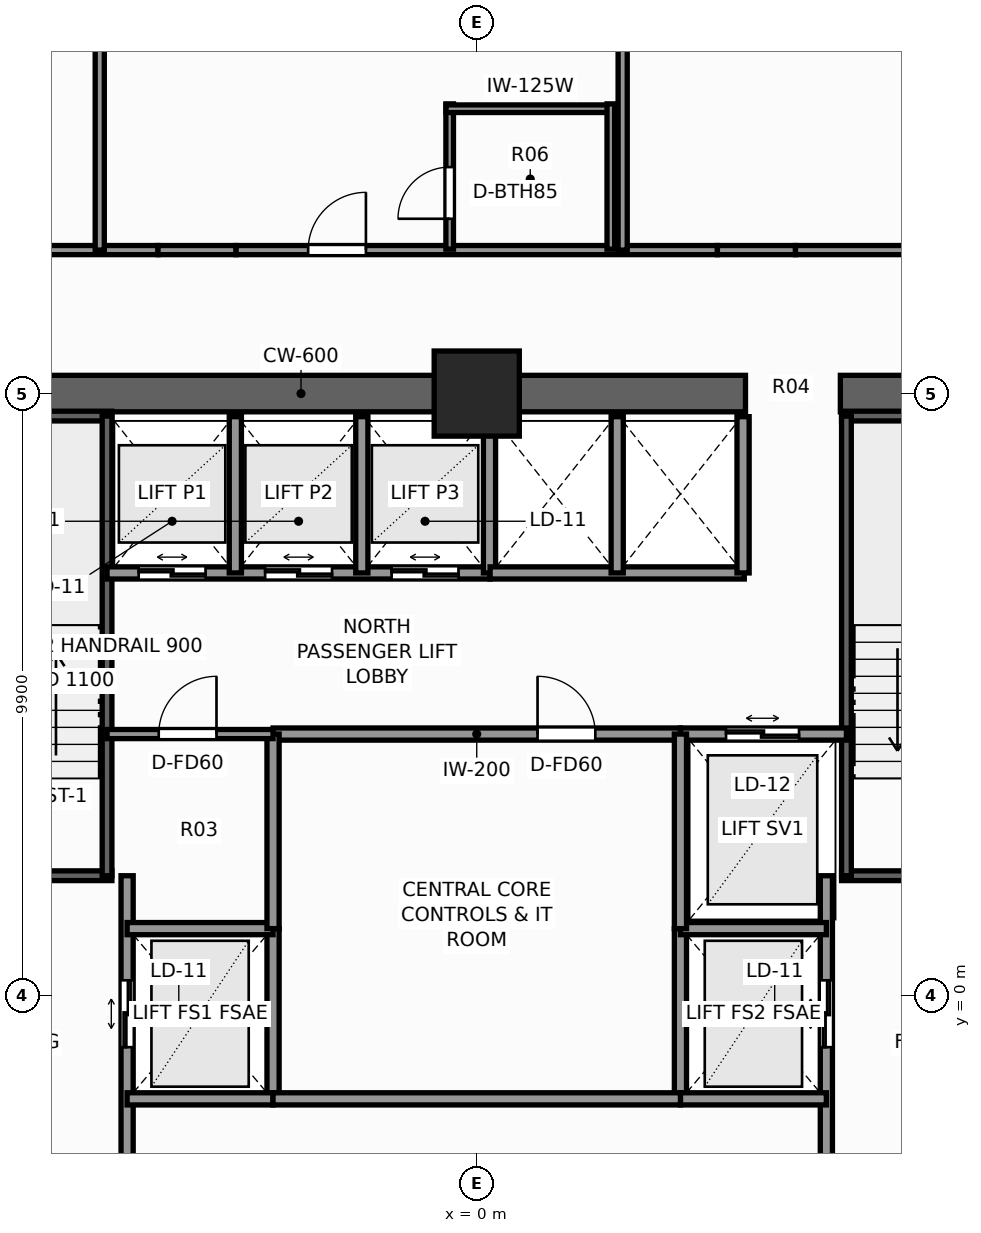
"""IFC4 building model, lengths in metres.
Left out: names, types, materials, properties, quantities, classifications, styles, units other than length and angle.
Written with IfcOpenShell. Run it as: python <this file> out.ifc"""

import sys

from ifc_helpers import new_model, si_unit, direction, frame, frame_2d, origin, origin_2d, place, context, subcontext, project, spatial, rectangle, extrude, element, fill, save


model = new_model("IFC4")
c1 = context("Model", 3, precision=1e-05, world=origin(), true_north=direction((0.0, 1.0)))
c2 = subcontext(c1, "Body", "Model", "MODEL_VIEW")
j1 = project(units=[si_unit("LENGTHUNIT", "METRE"), si_unit("PLANEANGLEUNIT", "RADIAN")], contexts=[c1])
p1 = place(None, origin())
s1 = spatial("IfcSite", under=j1, at=p1, CompositionType="ELEMENT")
p2 = place(p1, origin())
s2 = spatial("IfcBuilding", under=s1, at=p2, CompositionType="ELEMENT")
p3 = place(p2, frame((0.0, 0.0, 56.8)))
s3 = spatial("IfcBuildingStorey", under=s2, at=p3, CompositionType="ELEMENT", Elevation=56.8)
p4 = place(p3, frame((-10.2, 9.9, 0.0), z_axis=(0.0, 0.0, 1.0), x_axis=(1.0, 0.0, 0.0)))
e1 = element("IfcWall", 1, at=p4, inside=s3, PredefinedType="SHEAR", context=c2, shape_type="SweptSolid", body=[
    extrude(rectangle(XDim=14.62, YDim=0.6, at=frame_2d((7.31, 0.0))), origin(), (0.0, 0.0, 1.0), 3.3),
])
p5 = place(p3, frame((5.98, 9.9, 0.0), z_axis=(0.0, 0.0, 1.0), x_axis=(1.0, 0.0, 0.0)))
e2 = element("IfcWall", 2, at=p5, inside=s3, PredefinedType="SHEAR", context=c2, shape_type="SweptSolid", body=[
    extrude(rectangle(XDim=4.22, YDim=0.6, at=frame_2d((2.11, 0.0))), origin(), (0.0, 0.0, 1.0), 3.3),
])
p6 = place(p3, frame((0.0, 9.9, 0.0), z_axis=(0.0, 0.0, 1.0), x_axis=(1.0, 0.0, 0.0)))
e3 = element("IfcColumn", 3, at=p6, inside=s3, PredefinedType="COLUMN", context=c2, shape_type="SweptSolid", body=[
    extrude(rectangle(XDim=1.4, YDim=1.4, at=origin_2d()), origin(), (0.0, 0.0, 1.0), 3.3),
])
p7 = place(p3, frame((-9.52, 1.97, 0.0), z_axis=(0.0, 0.0, 1.0), x_axis=(1.0, 0.0, 0.0)))
e4 = element("IfcWall", 4, at=p7, inside=s3, PredefinedType="SHEAR", context=c2, shape_type="SweptSolid", body=[
    extrude(rectangle(XDim=3.52, YDim=0.16, at=frame_2d((1.76, 0.0))), origin(), (0.0, 0.0, 1.0), 3.3),
])
p8 = place(p7, frame((1.15, 0.0, 0.0)))
e5 = element("IfcOpeningElement", 5, at=p8, cuts=e4, PredefinedType="OPENING", context=c2, shape_type="SweptSolid", body=[
    extrude(rectangle(XDim=1.1, YDim=2.2, at=frame_2d((0.55, 1.1))), frame((0.0, 0.09, 0.0), z_axis=(0.0, -1.0, 0.0), x_axis=(1.0, 0.0, 0.0)), (0.0, 0.0, 1.0), 0.18),
])
p9 = place(p3, frame((-9.52, 9.53, 0.0), z_axis=(0.0, 0.0, 1.0), x_axis=(1.0, 0.0, 0.0)))
e6 = element("IfcWall", 6, at=p9, inside=s3, PredefinedType="SHEAR", context=c2, shape_type="SweptSolid", body=[
    extrude(rectangle(XDim=3.52, YDim=0.16, at=frame_2d((1.76, 0.0))), origin(), (0.0, 0.0, 1.0), 3.3),
])
p10 = place(p3, frame((-6.08, 1.97, 0.0), z_axis=(0.0, 0.0, 1.0), x_axis=(0.0, 1.0, 0.0)))
e7 = element("IfcWall", 7, at=p10, inside=s3, PredefinedType="SHEAR", context=c2, shape_type="SweptSolid", body=[
    extrude(rectangle(XDim=7.56, YDim=0.16, at=frame_2d((3.78, 0.0))), origin(), (0.0, 0.0, 1.0), 3.3),
])
p11 = place(p3, frame((6.0, 1.97, 0.0), z_axis=(0.0, 0.0, 1.0), x_axis=(1.0, 0.0, 0.0)))
e8 = element("IfcWall", 8, at=p11, inside=s3, PredefinedType="SHEAR", context=c2, shape_type="SweptSolid", body=[
    extrude(rectangle(XDim=3.52, YDim=0.16, at=frame_2d((1.76, 0.0))), origin(), (0.0, 0.0, 1.0), 3.3),
])
p12 = place(p11, frame((1.15, 0.0, 0.0)))
e9 = element("IfcOpeningElement", 9, at=p12, cuts=e8, PredefinedType="OPENING", context=c2, shape_type="SweptSolid", body=[
    extrude(rectangle(XDim=1.1, YDim=2.2, at=frame_2d((0.55, 1.1))), frame((0.0, 0.09, 0.0), z_axis=(0.0, -1.0, 0.0), x_axis=(1.0, 0.0, 0.0)), (0.0, 0.0, 1.0), 0.18),
])
p13 = place(p3, frame((6.0, 9.53, 0.0), z_axis=(0.0, 0.0, 1.0), x_axis=(1.0, 0.0, 0.0)))
e10 = element("IfcWall", 10, at=p13, inside=s3, PredefinedType="SHEAR", context=c2, shape_type="SweptSolid", body=[
    extrude(rectangle(XDim=3.52, YDim=0.16, at=frame_2d((1.76, 0.0))), origin(), (0.0, 0.0, 1.0), 3.3),
])
p14 = place(p3, frame((6.08, 1.97, 0.0), z_axis=(0.0, 0.0, 1.0), x_axis=(0.0, 1.0, 0.0)))
e11 = element("IfcWall", 11, at=p14, inside=s3, PredefinedType="SHEAR", context=c2, shape_type="SweptSolid", body=[
    extrude(rectangle(XDim=7.56, YDim=0.16, at=frame_2d((3.78, 0.0))), origin(), (0.0, 0.0, 1.0), 3.3),
])
p15 = place(p3, frame((-5.75, -3.6, 0.0), z_axis=(0.0, 0.0, 1.0), x_axis=(0.0, 1.0, 0.0)))
e12 = element("IfcWall", 12, at=p15, inside=s3, PredefinedType="SOLIDWALL", context=c2, shape_type="SweptSolid", body=[
    extrude(rectangle(XDim=5.57, YDim=0.2, at=frame_2d((2.785, 0.0))), origin(), (0.0, 0.0, 1.0), 3.06),
])
p16 = place(p15, frame((2.75, 0.0, 0.0)))
e13 = element("IfcOpeningElement", 13, at=p16, cuts=e12, PredefinedType="OPENING", context=c2, shape_type="SweptSolid", body=[
    extrude(rectangle(XDim=1.1, YDim=2.2, at=frame_2d((0.55, 1.1))), frame((0.0, 0.11, 0.0), z_axis=(0.0, -1.0, 0.0), x_axis=(1.0, 0.0, 0.0)), (0.0, 0.0, 1.0), 0.22),
])
p17 = place(p3, frame((-3.35, -1.7, 0.0), z_axis=(0.0, 0.0, 1.0), x_axis=(0.0, 1.0, 0.0)))
e14 = element("IfcWall", 14, at=p17, inside=s3, PredefinedType="SOLIDWALL", context=c2, shape_type="SweptSolid", body=[
    extrude(rectangle(XDim=2.8, YDim=0.2, at=frame_2d((1.4, 0.0))), origin(), (0.0, 0.0, 1.0), 3.06),
])
for number, where, z_axis, x_axis in (
    (15, (-5.75, -1.7, 0.0), (0.0, 0.0, 1.0), (1.0, 0.0, 0.0)),
    (16, (-5.75, 1.1, 0.0), (0.0, 0.0, 1.0), (1.0, 0.0, 0.0)),
):
    element("IfcWall", number, at=place(p3, frame(where, z_axis=z_axis, x_axis=x_axis)), inside=s3, PredefinedType="SOLIDWALL", context=c2, shape_type="SweptSolid", body=[
        extrude(rectangle(XDim=2.4, YDim=0.2, at=frame_2d((1.2, 0.0))), origin(), (0.0, 0.0, 1.0), 3.06),
    ])
p18 = place(p3, frame((5.75, -3.6, 0.0), z_axis=(0.0, 0.0, 1.0), x_axis=(0.0, 1.0, 0.0)))
e17 = element("IfcWall", 17, at=p18, inside=s3, PredefinedType="SOLIDWALL", context=c2, shape_type="SweptSolid", body=[
    extrude(rectangle(XDim=5.57, YDim=0.2, at=frame_2d((2.785, 0.0))), origin(), (0.0, 0.0, 1.0), 3.06),
])
p19 = place(p18, frame((2.75, 0.0, 0.0)))
e18 = element("IfcOpeningElement", 18, at=p19, cuts=e17, PredefinedType="OPENING", context=c2, shape_type="SweptSolid", body=[
    extrude(rectangle(XDim=1.1, YDim=2.2, at=frame_2d((0.55, 1.1))), frame((0.0, 0.11, 0.0), z_axis=(0.0, -1.0, 0.0), x_axis=(1.0, 0.0, 0.0)), (0.0, 0.0, 1.0), 0.22),
])
p20 = place(p3, frame((3.35, -1.7, 0.0), z_axis=(0.0, 0.0, 1.0), x_axis=(0.0, 1.0, 0.0)))
e19 = element("IfcWall", 19, at=p20, inside=s3, PredefinedType="SOLIDWALL", context=c2, shape_type="SweptSolid", body=[
    extrude(rectangle(XDim=2.8, YDim=0.2, at=frame_2d((1.4, 0.0))), origin(), (0.0, 0.0, 1.0), 3.06),
])
for number, where, z_axis, x_axis in (
    (20, (3.35, -1.7, 0.0), (0.0, 0.0, 1.0), (1.0, 0.0, 0.0)),
    (21, (3.35, 1.1, 0.0), (0.0, 0.0, 1.0), (1.0, 0.0, 0.0)),
):
    element("IfcWall", number, at=place(p3, frame(where, z_axis=z_axis, x_axis=x_axis)), inside=s3, PredefinedType="SOLIDWALL", context=c2, shape_type="SweptSolid", body=[
        extrude(rectangle(XDim=2.4, YDim=0.2, at=frame_2d((1.2, 0.0))), origin(), (0.0, 0.0, 1.0), 3.06),
    ])
p21 = place(p3, frame((3.35, 4.3, 0.0), z_axis=(0.0, 0.0, 1.0), x_axis=(1.0, 0.0, 0.0)))
e22 = element("IfcWall", 22, at=p21, inside=s3, PredefinedType="SOLIDWALL", context=c2, shape_type="SweptSolid", body=[
    extrude(rectangle(XDim=2.73, YDim=0.2, at=frame_2d((1.365, 0.0))), origin(), (0.0, 0.0, 1.0), 3.06),
])
p22 = place(p21, frame((0.75, 0.0, 0.0)))
e23 = element("IfcOpeningElement", 23, at=p22, cuts=e22, PredefinedType="OPENING", context=c2, shape_type="SweptSolid", body=[
    extrude(rectangle(XDim=1.2, YDim=2.25, at=frame_2d((0.6, 1.125))), frame((0.0, 0.11, 0.0), z_axis=(0.0, -1.0, 0.0), x_axis=(1.0, 0.0, 0.0)), (0.0, 0.0, 1.0), 0.22),
])
p23 = place(p3, frame((-6.08, 6.95, 0.0), z_axis=(0.0, 0.0, 1.0), x_axis=(1.0, 0.0, 0.0)))
e24 = element("IfcWall", 24, at=p23, inside=s3, PredefinedType="SOLIDWALL", context=c2, shape_type="SweptSolid", body=[
    extrude(rectangle(XDim=6.3, YDim=0.2, at=frame_2d((3.15, 0.0))), origin(), (0.0, 0.0, 1.0), 3.06),
])
p24 = place(p23, frame((0.52, 0.0, 0.0)))
e25 = element("IfcOpeningElement", 25, at=p24, cuts=e24, PredefinedType="OPENING", context=c2, shape_type="SweptSolid", body=[
    extrude(rectangle(XDim=1.1, YDim=2.2, at=frame_2d((0.55, 1.1))), frame((0.0, 0.11, 0.0), z_axis=(0.0, -1.0, 0.0), x_axis=(1.0, 0.0, 0.0)), (0.0, 0.0, 1.0), 0.22),
])
p25 = place(p23, frame((2.6, 0.0, 0.0)))
e26 = element("IfcOpeningElement", 26, at=p25, cuts=e24, PredefinedType="OPENING", context=c2, shape_type="SweptSolid", body=[
    extrude(rectangle(XDim=1.1, YDim=2.2, at=frame_2d((0.55, 1.1))), frame((0.0, 0.11, 0.0), z_axis=(0.0, -1.0, 0.0), x_axis=(1.0, 0.0, 0.0)), (0.0, 0.0, 1.0), 0.22),
])
p26 = place(p23, frame((4.68, 0.0, 0.0)))
e27 = element("IfcOpeningElement", 27, at=p26, cuts=e24, PredefinedType="OPENING", context=c2, shape_type="SweptSolid", body=[
    extrude(rectangle(XDim=1.1, YDim=2.2, at=frame_2d((0.55, 1.1))), frame((0.0, 0.11, 0.0), z_axis=(0.0, -1.0, 0.0), x_axis=(1.0, 0.0, 0.0)), (0.0, 0.0, 1.0), 0.22),
])
for number, where, z_axis, x_axis in (
    (28, (-3.97, 6.95, 0.0), (0.0, 0.0, 1.0), (0.0, 1.0, 0.0)),
    (29, (-1.89, 6.95, 0.0), (0.0, 0.0, 1.0), (0.0, 1.0, 0.0)),
    (30, (0.21, 6.95, 0.0), (0.0, 0.0, 1.0), (0.0, 1.0, 0.0)),
):
    element("IfcWall", number, at=place(p3, frame(where, z_axis=z_axis, x_axis=x_axis)), inside=s3, PredefinedType="SOLIDWALL", context=c2, shape_type="SweptSolid", body=[
        extrude(rectangle(XDim=2.57, YDim=0.2, at=frame_2d((1.285, 0.0))), origin(), (0.0, 0.0, 1.0), 3.06),
    ])
p27 = place(p3, frame((0.22, 6.95, 0.0), z_axis=(0.0, 0.0, 1.0), x_axis=(1.0, 0.0, 0.0)))
e31 = element("IfcWall", 31, at=p27, inside=s3, PredefinedType="SOLIDWALL", context=c2, shape_type="SweptSolid", body=[
    extrude(rectangle(XDim=4.18, YDim=0.2, at=frame_2d((2.09, 0.0))), origin(), (0.0, 0.0, 1.0), 3.06),
])
for number, where, z_axis, x_axis in (
    (32, (4.38, 6.95, 0.0), (0.0, 0.0, 1.0), (0.0, 1.0, 0.0)),
    (33, (2.31, 6.95, 0.0), (0.0, 0.0, 1.0), (0.0, 1.0, 0.0)),
):
    element("IfcWall", number, at=place(p3, frame(where, z_axis=z_axis, x_axis=x_axis)), inside=s3, PredefinedType="SOLIDWALL", context=c2, shape_type="SweptSolid", body=[
        extrude(rectangle(XDim=2.57, YDim=0.2, at=frame_2d((1.285, 0.0))), origin(), (0.0, 0.0, 1.0), 3.06),
    ])
p28 = place(p3, frame((-3.35, 4.3, 0.0), z_axis=(0.0, 0.0, 1.0), x_axis=(1.0, 0.0, 0.0)))
e34 = element("IfcWall", 34, at=p28, inside=s3, PredefinedType="SOLIDWALL", context=c2, shape_type="SweptSolid", body=[
    extrude(rectangle(XDim=6.7, YDim=0.2, at=frame_2d((3.35, 0.0))), origin(), (0.0, 0.0, 1.0), 3.06),
])
p29 = place(p28, frame((4.35, 0.0, 0.0)))
e35 = element("IfcOpeningElement", 35, at=p29, cuts=e34, PredefinedType="OPENING", context=c2, shape_type="SweptSolid", body=[
    extrude(rectangle(XDim=0.95, YDim=2.06, at=frame_2d((0.475, 1.03))), frame((0.0, 0.11, 0.0), z_axis=(0.0, -1.0, 0.0), x_axis=(1.0, 0.0, 0.0)), (0.0, 0.0, 1.0), 0.22),
])
p30 = place(p3, frame((-3.35, -1.7, 0.0), z_axis=(0.0, 0.0, 1.0), x_axis=(1.0, 0.0, 0.0)))
e36 = element("IfcWall", 36, at=p30, inside=s3, PredefinedType="SOLIDWALL", context=c2, shape_type="SweptSolid", body=[
    extrude(rectangle(XDim=6.7, YDim=0.2, at=frame_2d((3.35, 0.0))), origin(), (0.0, 0.0, 1.0), 3.06),
])
for number, where, z_axis, x_axis in (
    (37, (-3.35, 1.1, 0.0), (0.0, 0.0, 1.0), (0.0, 1.0, 0.0)),
    (38, (3.35, 1.1, 0.0), (0.0, 0.0, 1.0), (0.0, 1.0, 0.0)),
):
    element("IfcWall", number, at=place(p3, frame(where, z_axis=z_axis, x_axis=x_axis)), inside=s3, PredefinedType="SOLIDWALL", context=c2, shape_type="SweptSolid", body=[
        extrude(rectangle(XDim=3.2, YDim=0.2, at=frame_2d((1.6, 0.0))), origin(), (0.0, 0.0, 1.0), 3.06),
    ])
p31 = place(p3, frame((-6.08, 4.3, 0.0), z_axis=(0.0, 0.0, 1.0), x_axis=(1.0, 0.0, 0.0)))
e39 = element("IfcWall", 39, at=p31, inside=s3, PredefinedType="PARTITIONING", context=c2, shape_type="SweptSolid", body=[
    extrude(rectangle(XDim=2.73, YDim=0.15, at=frame_2d((1.365, 0.0))), origin(), (0.0, 0.0, 1.0), 3.06),
])
p32 = place(p31, frame((0.85, 0.0, 0.0)))
e40 = element("IfcOpeningElement", 40, at=p32, cuts=e39, PredefinedType="OPENING", context=c2, shape_type="SweptSolid", body=[
    extrude(rectangle(XDim=0.95, YDim=2.06, at=frame_2d((0.475, 1.03))), frame((0.0, 0.085, 0.0), z_axis=(0.0, -1.0, 0.0), x_axis=(1.0, 0.0, 0.0)), (0.0, 0.0, 1.0), 0.17),
])
p33 = place(p3, frame((-10.092, 12.26, 0.0), z_axis=(0.0, 0.0, 1.0), x_axis=(1.0, 0.0, 0.0)))
e41 = element("IfcWall", 41, at=p33, inside=s3, PredefinedType="PARTITIONING", context=c2, shape_type="SweptSolid", body=[
    extrude(rectangle(XDim=4.85, YDim=0.15, at=frame_2d((2.425, 0.0))), origin(), (0.0, 0.0, 1.0), 3.06),
])
p34 = place(p33, frame((1.552, 0.0, 0.0)))
e42 = element("IfcOpeningElement", 42, at=p34, cuts=e41, PredefinedType="OPENING", context=c2, shape_type="SweptSolid", body=[
    extrude(rectangle(XDim=0.9, YDim=2.06, at=frame_2d((0.45, 1.03))), frame((0.0, 0.085, 0.0), z_axis=(0.0, -1.0, 0.0), x_axis=(1.0, 0.0, 0.0)), (0.0, 0.0, 1.0), 0.17),
])
p35 = place(p3, frame((-5.242, 12.26, 0.0), z_axis=(0.0, 0.0, 1.0), x_axis=(1.0, 0.0, 0.0)))
e43 = element("IfcWall", 43, at=p35, inside=s3, PredefinedType="PARTITIONING", context=c2, shape_type="SweptSolid", body=[
    extrude(rectangle(XDim=1.284, YDim=0.15, at=frame_2d((0.642, 0.0))), origin(), (0.0, 0.0, 1.0), 1.245),
])
p36 = place(p3, frame((-3.958, 12.26, 0.0), z_axis=(0.0, 0.0, 1.0), x_axis=(1.0, 0.0, 0.0)))
e44 = element("IfcWall", 44, at=p36, inside=s3, PredefinedType="PARTITIONING", context=c2, shape_type="SweptSolid", body=[
    extrude(rectangle(XDim=7.916, YDim=0.15, at=frame_2d((3.958, 0.0))), origin(), (0.0, 0.0, 1.0), 2.585),
])
p37 = place(p36, frame((1.186, 0.0, 0.0)))
e45 = element("IfcOpeningElement", 45, at=p37, cuts=e44, PredefinedType="OPENING", context=c2, shape_type="SweptSolid", body=[
    extrude(rectangle(XDim=0.95, YDim=2.06, at=frame_2d((0.475, 1.03))), frame((0.0, 0.085, 0.0), z_axis=(0.0, -1.0, 0.0), x_axis=(1.0, 0.0, 0.0)), (0.0, 0.0, 1.0), 0.17),
])
p38 = place(p3, frame((3.958, 12.26, 0.0), z_axis=(0.0, 0.0, 1.0), x_axis=(1.0, 0.0, 0.0)))
e46 = element("IfcWall", 46, at=p38, inside=s3, PredefinedType="PARTITIONING", context=c2, shape_type="SweptSolid", body=[
    extrude(rectangle(XDim=1.284, YDim=0.15, at=frame_2d((0.642, 0.0))), origin(), (0.0, 0.0, 1.0), 1.245),
])
p39 = place(p3, frame((5.242, 12.26, 0.0), z_axis=(0.0, 0.0, 1.0), x_axis=(1.0, 0.0, 0.0)))
e47 = element("IfcWall", 47, at=p39, inside=s3, PredefinedType="PARTITIONING", context=c2, shape_type="SweptSolid", body=[
    extrude(rectangle(XDim=4.85, YDim=0.15, at=frame_2d((2.425, 0.0))), origin(), (0.0, 0.0, 1.0), 3.06),
])
p40 = place(p39, frame((1.843, 0.0, 0.0)))
e48 = element("IfcOpeningElement", 48, at=p40, cuts=e47, PredefinedType="OPENING", context=c2, shape_type="SweptSolid", body=[
    extrude(rectangle(XDim=0.9, YDim=2.06, at=frame_2d((0.45, 1.03))), frame((0.0, 0.085, 0.0), z_axis=(0.0, -1.0, 0.0), x_axis=(1.0, 0.0, 0.0)), (0.0, 0.0, 1.0), 0.17),
])
for number, where, z_axis, x_axis in (
    (49, (-6.2, 12.26, 0.0), (0.0, 0.0, 1.0), (0.0, 1.0, 0.0)),
    (50, (2.4, 12.26, 0.0), (0.0, 0.0, 1.0), (0.0, 1.0, 0.0)),
):
    element("IfcWall", number, at=place(p3, frame(where, z_axis=z_axis, x_axis=x_axis)), inside=s3, PredefinedType="PARTITIONING", context=c2, shape_type="SweptSolid", body=[
        extrude(rectangle(XDim=9.72, YDim=0.15, at=frame_2d((4.86, 0.0))), origin(), (0.0, 0.0, 1.0), 2.429),
    ])
p41 = place(p3, frame((-0.445, 12.275, 0.0), z_axis=(0.0, 0.0, 1.0), x_axis=(0.0, 1.0, 0.0)))
e51 = element("IfcWall", 51, at=p41, inside=s3, PredefinedType="PARTITIONING", context=c2, shape_type="SweptSolid", body=[
    extrude(rectangle(XDim=2.39, YDim=0.125, at=frame_2d((1.195, 0.0))), origin(), (0.0, 0.0, 1.0), 3.06),
])
p42 = place(p41, frame((0.5, 0.0, 0.0)))
e52 = element("IfcOpeningElement", 52, at=p42, cuts=e51, PredefinedType="OPENING", context=c2, shape_type="SweptSolid", body=[
    extrude(rectangle(XDim=0.85, YDim=2.03, at=frame_2d((0.425, 1.015))), frame((0.0, 0.073, 0.0), z_axis=(0.0, -1.0, 0.0), x_axis=(1.0, 0.0, 0.0)), (0.0, 0.0, 1.0), 0.145),
])
p43 = place(p3, frame((-0.505, 14.585, 0.0), z_axis=(0.0, 0.0, 1.0), x_axis=(1.0, 0.0, 0.0)))
e53 = element("IfcWall", 53, at=p43, inside=s3, PredefinedType="PARTITIONING", context=c2, shape_type="SweptSolid", body=[
    extrude(rectangle(XDim=2.77, YDim=0.125, at=frame_2d((1.385, 0.0))), origin(), (0.0, 0.0, 1.0), 2.585),
])
p44 = place(p3, frame((2.205, 12.275, 0.0), z_axis=(0.0, 0.0, 1.0), x_axis=(0.0, 1.0, 0.0)))
e54 = element("IfcWall", 54, at=p44, inside=s3, PredefinedType="PARTITIONING", context=c2, shape_type="SweptSolid", body=[
    extrude(rectangle(XDim=2.39, YDim=0.125, at=frame_2d((1.195, 0.0))), origin(), (0.0, 0.0, 1.0), 3.06),
])
p45 = place(p16, origin())
e55 = element("IfcDoor", 55, at=p45, inside=s3, OperationType="DOUBLE_DOOR_SLIDING", PredefinedType="DOOR", context=c2, shape_type="SweptSolid", body=[
    extrude(rectangle(XDim=1.1, YDim=2.2, at=frame_2d((0.55, 1.1))), frame((0.0, 0.025, 0.0), z_axis=(0.0, -1.0, 0.0), x_axis=(1.0, 0.0, 0.0)), (0.0, 0.0, 1.0), 0.05),
])
fill(e13, e55)
p46 = place(p19, origin())
e56 = element("IfcDoor", 56, at=p46, inside=s3, OperationType="DOUBLE_DOOR_SLIDING", PredefinedType="DOOR", context=c2, shape_type="SweptSolid", body=[
    extrude(rectangle(XDim=1.1, YDim=2.2, at=frame_2d((0.55, 1.1))), frame((0.0, 0.025, 0.0), z_axis=(0.0, -1.0, 0.0), x_axis=(1.0, 0.0, 0.0)), (0.0, 0.0, 1.0), 0.05),
])
fill(e18, e56)
p47 = place(p22, origin())
e57 = element("IfcDoor", 57, at=p47, inside=s3, OperationType="DOUBLE_DOOR_SLIDING", PredefinedType="DOOR", context=c2, shape_type="SweptSolid", body=[
    extrude(rectangle(XDim=1.2, YDim=2.25, at=frame_2d((0.6, 1.125))), frame((0.0, 0.025, 0.0), z_axis=(0.0, -1.0, 0.0), x_axis=(1.0, 0.0, 0.0)), (0.0, 0.0, 1.0), 0.05),
])
fill(e23, e57)
p48 = place(p24, origin())
e58 = element("IfcDoor", 58, at=p48, inside=s3, OperationType="DOUBLE_DOOR_SLIDING", PredefinedType="DOOR", context=c2, shape_type="SweptSolid", body=[
    extrude(rectangle(XDim=1.1, YDim=2.2, at=frame_2d((0.55, 1.1))), frame((0.0, 0.025, 0.0), z_axis=(0.0, -1.0, 0.0), x_axis=(1.0, 0.0, 0.0)), (0.0, 0.0, 1.0), 0.05),
])
fill(e25, e58)
p49 = place(p25, origin())
e59 = element("IfcDoor", 59, at=p49, inside=s3, OperationType="DOUBLE_DOOR_SLIDING", PredefinedType="DOOR", context=c2, shape_type="SweptSolid", body=[
    extrude(rectangle(XDim=1.1, YDim=2.2, at=frame_2d((0.55, 1.1))), frame((0.0, 0.025, 0.0), z_axis=(0.0, -1.0, 0.0), x_axis=(1.0, 0.0, 0.0)), (0.0, 0.0, 1.0), 0.05),
])
fill(e26, e59)
p50 = place(p26, origin())
e60 = element("IfcDoor", 60, at=p50, inside=s3, OperationType="DOUBLE_DOOR_SLIDING", PredefinedType="DOOR", context=c2, shape_type="SweptSolid", body=[
    extrude(rectangle(XDim=1.1, YDim=2.2, at=frame_2d((0.55, 1.1))), frame((0.0, 0.025, 0.0), z_axis=(0.0, -1.0, 0.0), x_axis=(1.0, 0.0, 0.0)), (0.0, 0.0, 1.0), 0.05),
])
fill(e27, e60)
p51 = place(p29, origin())
e61 = element("IfcDoor", 61, at=p51, inside=s3, OperationType="SINGLE_SWING_LEFT", PredefinedType="DOOR", context=c2, shape_type="SweptSolid", body=[
    extrude(rectangle(XDim=0.95, YDim=2.06, at=frame_2d((0.475, 1.03))), frame((0.0, 0.025, 0.0), z_axis=(0.0, -1.0, 0.0), x_axis=(1.0, 0.0, 0.0)), (0.0, 0.0, 1.0), 0.05),
])
fill(e35, e61)
p52 = place(p32, origin())
e62 = element("IfcDoor", 62, at=p52, inside=s3, OperationType="SINGLE_SWING_RIGHT", PredefinedType="DOOR", context=c2, shape_type="SweptSolid", body=[
    extrude(rectangle(XDim=0.95, YDim=2.06, at=frame_2d((0.475, 1.03))), frame((0.0, 0.025, 0.0), z_axis=(0.0, -1.0, 0.0), x_axis=(1.0, 0.0, 0.0)), (0.0, 0.0, 1.0), 0.05),
])
fill(e40, e62)
p53 = place(p42, origin())
e63 = element("IfcDoor", 63, at=p53, inside=s3, OperationType="SINGLE_SWING_LEFT", PredefinedType="DOOR", context=c2, shape_type="SweptSolid", body=[
    extrude(rectangle(XDim=0.85, YDim=2.03, at=frame_2d((0.425, 1.015))), frame((0.0, 0.025, 0.0), z_axis=(0.0, -1.0, 0.0), x_axis=(1.0, 0.0, 0.0)), (0.0, 0.0, 1.0), 0.05),
])
fill(e52, e63)
p54 = place(p37, origin())
e64 = element("IfcDoor", 64, at=p54, inside=s3, OperationType="SINGLE_SWING_RIGHT", PredefinedType="DOOR", context=c2, shape_type="SweptSolid", body=[
    extrude(rectangle(XDim=0.95, YDim=2.06, at=frame_2d((0.475, 1.03))), frame((0.0, 0.025, 0.0), z_axis=(0.0, -1.0, 0.0), x_axis=(1.0, 0.0, 0.0)), (0.0, 0.0, 1.0), 0.05),
])
fill(e45, e64)
save(model, sys.argv[1])
